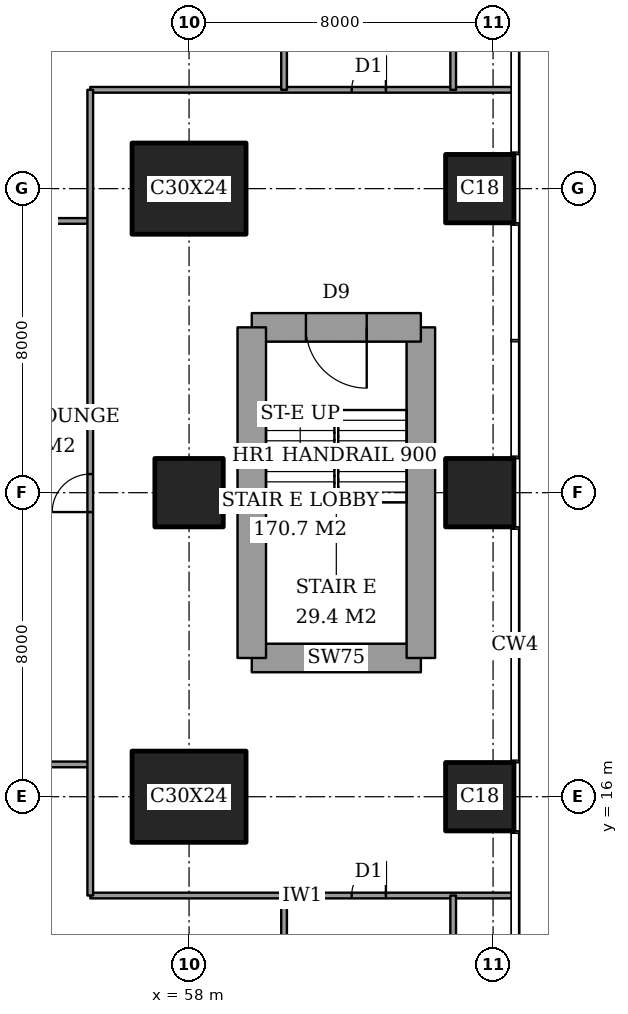
"""IFC4 building model, lengths in metres.
Left out: names, types, materials, properties, quantities, classifications, styles, units other than length and angle.
Written with IfcOpenShell. Run it as: python <this file> out.ifc"""

import sys

from ifc_helpers import new_model, si_unit, direction, frame, frame_2d, origin, origin_2d, place, context, subcontext, project, spatial, rectangle, extrude, element, fill, save


model = new_model("IFC4")
c1 = context("Model", 3, precision=1e-05, world=origin(), true_north=direction((0.0, 1.0)))
c2 = subcontext(c1, "Body", "Model", "MODEL_VIEW")
j1 = project(units=[si_unit("LENGTHUNIT", "METRE"), si_unit("PLANEANGLEUNIT", "RADIAN")], contexts=[c1])
p1 = place(None, origin())
s1 = spatial("IfcSite", under=j1, at=p1, CompositionType="ELEMENT")
p2 = place(p1, origin())
s2 = spatial("IfcBuilding", under=s1, at=p2, CompositionType="ELEMENT")
p3 = place(p2, frame((0.0, 0.0, 200.2)))
s3 = spatial("IfcBuildingStorey", under=s2, at=p3, CompositionType="ELEMENT", Elevation=200.2)
p4 = place(p3, frame((58.0, 16.0, 0.0), z_axis=(0.0, 0.0, 1.0), x_axis=(1.0, 0.0, 0.0)))
e1 = element("IfcColumn", 1, at=p4, inside=s3, PredefinedType="COLUMN", context=c2, shape_type="SweptSolid", body=[
    extrude(rectangle(XDim=3.0, YDim=2.4, at=origin_2d()), origin(), (0.0, 0.0, 1.0), 3.6),
])
p5 = place(p3, frame((58.0, 24.0, 0.0), z_axis=(0.0, 0.0, 1.0), x_axis=(1.0, 0.0, 0.0)))
e2 = element("IfcColumn", 2, at=p5, inside=s3, PredefinedType="COLUMN", context=c2, shape_type="SweptSolid", body=[
    extrude(rectangle(XDim=1.8, YDim=1.8, at=origin_2d()), origin(), (0.0, 0.0, 1.0), 3.6),
])
p6 = place(p3, frame((58.0, 32.0, 0.0), z_axis=(0.0, 0.0, 1.0), x_axis=(1.0, 0.0, 0.0)))
e3 = element("IfcColumn", 3, at=p6, inside=s3, PredefinedType="COLUMN", context=c2, shape_type="SweptSolid", body=[
    extrude(rectangle(XDim=3.0, YDim=2.4, at=origin_2d()), origin(), (0.0, 0.0, 1.0), 3.6),
])
for number, where, z_axis, x_axis in (
    (4, (65.65, 16.0, 0.0), (0.0, 0.0, 1.0), (1.0, 0.0, 0.0)),
    (5, (65.65, 24.0, 0.0), (0.0, 0.0, 1.0), (1.0, 0.0, 0.0)),
    (6, (65.65, 32.0, 0.0), (0.0, 0.0, 1.0), (1.0, 0.0, 0.0)),
):
    element("IfcColumn", number, at=place(p3, frame(where, z_axis=z_axis, x_axis=x_axis)), inside=s3, PredefinedType="COLUMN", context=c2, shape_type="SweptSolid", body=[
        extrude(rectangle(XDim=1.8, YDim=1.8, at=origin_2d()), origin(), (0.0, 0.0, 1.0), 3.6),
    ])
p7 = place(p3, frame((59.65, 19.65, 0.0), z_axis=(0.0, 0.0, 1.0), x_axis=(1.0, 0.0, 0.0)))
e7 = element("IfcWall", 7, at=p7, inside=s3, PredefinedType="SHEAR", context=c2, shape_type="SweptSolid", body=[
    extrude(rectangle(XDim=4.45, YDim=0.75, at=frame_2d((2.225, 0.0))), origin(), (0.0, 0.0, 1.0), 3.6),
])
p8 = place(p3, frame((64.1, 19.65, 0.0), z_axis=(0.0, 0.0, 1.0), x_axis=(0.0, 1.0, 0.0)))
e8 = element("IfcWall", 8, at=p8, inside=s3, PredefinedType="SHEAR", context=c2, shape_type="SweptSolid", body=[
    extrude(rectangle(XDim=8.7, YDim=0.75, at=frame_2d((4.35, 0.0))), origin(), (0.0, 0.0, 1.0), 3.6),
])
p9 = place(p3, frame((64.1, 28.35, 0.0), z_axis=(0.0, 0.0, 1.0), x_axis=(-1.0, 0.0, 0.0)))
e9 = element("IfcWall", 9, at=p9, inside=s3, PredefinedType="SHEAR", context=c2, shape_type="SweptSolid", body=[
    extrude(rectangle(XDim=4.45, YDim=0.75, at=frame_2d((2.225, 0.0))), origin(), (0.0, 0.0, 1.0), 3.6),
])
p10 = place(p9, frame((1.425, 0.0, 0.0)))
e10 = element("IfcOpeningElement", 10, at=p10, cuts=e9, PredefinedType="OPENING", context=c2, shape_type="SweptSolid", body=[
    extrude(rectangle(XDim=1.6, YDim=2.1, at=frame_2d((0.8, 1.05))), frame((0.0, 0.385, 0.0), z_axis=(0.0, -1.0, 0.0), x_axis=(1.0, 0.0, 0.0)), (0.0, 0.0, 1.0), 0.77),
])
p11 = place(p3, frame((59.65, 28.35, 0.0), z_axis=(0.0, 0.0, 1.0), x_axis=(0.0, -1.0, 0.0)))
e11 = element("IfcWall", 11, at=p11, inside=s3, PredefinedType="SHEAR", context=c2, shape_type="SweptSolid", body=[
    extrude(rectangle(XDim=8.7, YDim=0.75, at=frame_2d((4.35, 0.0))), origin(), (0.0, 0.0, 1.0), 3.6),
])
p12 = place(p3, frame((55.4, 13.4, 0.0), z_axis=(0.0, 0.0, 1.0), x_axis=(1.0, 0.0, 0.0)))
e12 = element("IfcWall", 12, at=p12, inside=s3, PredefinedType="PARTITIONING", context=c2, shape_type="SweptSolid", body=[
    extrude(rectangle(XDim=11.161, YDim=0.15, at=frame_2d((5.581, 0.0))), origin(), (0.0, 0.0, 1.0), 3.35),
])
p13 = place(p12, frame((6.88, 0.0, 0.0)))
e13 = element("IfcOpeningElement", 13, at=p13, cuts=e12, PredefinedType="OPENING", context=c2, shape_type="SweptSolid", body=[
    extrude(rectangle(XDim=0.9, YDim=2.1, at=frame_2d((0.45, 1.05))), frame((0.0, 0.085, 0.0), z_axis=(0.0, -1.0, 0.0), x_axis=(1.0, 0.0, 0.0)), (0.0, 0.0, 1.0), 0.17),
])
for number, where, z_axis, x_axis in (
    (14, (52.5, 16.85, 0.0), (0.0, 0.0, 1.0), (1.0, 0.0, 0.0)),
    (15, (52.5, 31.15, 0.0), (0.0, 0.0, 1.0), (1.0, 0.0, 0.0)),
):
    element("IfcWall", number, at=place(p3, frame(where, z_axis=z_axis, x_axis=x_axis)), inside=s3, PredefinedType="PARTITIONING", context=c2, shape_type="SweptSolid", body=[
        extrude(rectangle(XDim=2.9, YDim=0.15, at=frame_2d((1.45, 0.0))), origin(), (0.0, 0.0, 1.0), 3.35),
    ])
p14 = place(p3, frame((55.4, 34.6, 0.0), z_axis=(0.0, 0.0, 1.0), x_axis=(1.0, 0.0, 0.0)))
e16 = element("IfcWall", 16, at=p14, inside=s3, PredefinedType="PARTITIONING", context=c2, shape_type="SweptSolid", body=[
    extrude(rectangle(XDim=11.161, YDim=0.15, at=frame_2d((5.581, 0.0))), origin(), (0.0, 0.0, 1.0), 3.35),
])
p15 = place(p14, frame((6.88, 0.0, 0.0)))
e17 = element("IfcOpeningElement", 17, at=p15, cuts=e16, PredefinedType="OPENING", context=c2, shape_type="SweptSolid", body=[
    extrude(rectangle(XDim=0.9, YDim=2.1, at=frame_2d((0.45, 1.05))), frame((0.0, 0.085, 0.0), z_axis=(0.0, -1.0, 0.0), x_axis=(1.0, 0.0, 0.0)), (0.0, 0.0, 1.0), 0.17),
])
p16 = place(p3, frame((55.4, 13.4, 0.0), z_axis=(0.0, 0.0, 1.0), x_axis=(0.0, 1.0, 0.0)))
e18 = element("IfcWall", 18, at=p16, inside=s3, PredefinedType="PARTITIONING", context=c2, shape_type="SweptSolid", body=[
    extrude(rectangle(XDim=21.2, YDim=0.15, at=frame_2d((10.6, 0.0))), origin(), (0.0, 0.0, 1.0), 3.35),
])
p17 = place(p16, frame((10.09, 0.0, 0.0)))
e19 = element("IfcOpeningElement", 19, at=p17, cuts=e18, PredefinedType="OPENING", context=c2, shape_type="SweptSolid", body=[
    extrude(rectangle(XDim=1.0, YDim=2.1, at=frame_2d((0.5, 1.05))), frame((0.0, 0.085, 0.0), z_axis=(0.0, -1.0, 0.0), x_axis=(1.0, 0.0, 0.0)), (0.0, 0.0, 1.0), 0.17),
])
p18 = place(p3, frame((60.5, -0.45, 0.0), z_axis=(0.0, 0.0, 1.0), x_axis=(0.0, 1.0, 0.0)))
e20 = element("IfcWall", 20, at=p18, inside=s3, PredefinedType="PARTITIONING", context=c2, shape_type="SweptSolid", body=[
    extrude(rectangle(XDim=13.85, YDim=0.15, at=frame_2d((6.925, 0.0))), origin(), (0.0, 0.0, 1.0), 3.35),
])
p19 = place(p18, frame((6.48, 0.0, 0.0)))
e21 = element("IfcOpeningElement", 21, at=p19, cuts=e20, PredefinedType="OPENING", context=c2, shape_type="SweptSolid", body=[
    extrude(rectangle(XDim=0.9, YDim=2.1, at=frame_2d((0.45, 1.05))), frame((0.0, 0.085, 0.0), z_axis=(0.0, -1.0, 0.0), x_axis=(1.0, 0.0, 0.0)), (0.0, 0.0, 1.0), 0.17),
])
p20 = place(p3, frame((60.5, 34.6, 0.0), z_axis=(0.0, 0.0, 1.0), x_axis=(0.0, 1.0, 0.0)))
e22 = element("IfcWall", 22, at=p20, inside=s3, PredefinedType="PARTITIONING", context=c2, shape_type="SweptSolid", body=[
    extrude(rectangle(XDim=13.85, YDim=0.15, at=frame_2d((6.925, 0.0))), origin(), (0.0, 0.0, 1.0), 3.35),
])
p21 = place(p20, frame((6.48, 0.0, 0.0)))
e23 = element("IfcOpeningElement", 23, at=p21, cuts=e22, PredefinedType="OPENING", context=c2, shape_type="SweptSolid", body=[
    extrude(rectangle(XDim=0.9, YDim=2.1, at=frame_2d((0.45, 1.05))), frame((0.0, 0.085, 0.0), z_axis=(0.0, -1.0, 0.0), x_axis=(1.0, 0.0, 0.0)), (0.0, 0.0, 1.0), 0.17),
])
for number, where, z_axis, x_axis in (
    (24, (64.95, 8.9, 0.0), (0.0, 0.0, 1.0), (0.0, 1.0, 0.0)),
    (25, (64.95, 34.6, 0.0), (0.0, 0.0, 1.0), (0.0, 1.0, 0.0)),
):
    element("IfcWall", number, at=place(p3, frame(where, z_axis=z_axis, x_axis=x_axis)), inside=s3, PredefinedType="PARTITIONING", context=c2, shape_type="SweptSolid", body=[
        extrude(rectangle(XDim=4.5, YDim=0.15, at=frame_2d((2.25, 0.0))), origin(), (0.0, 0.0, 1.0), 3.35),
    ])
p22 = place(p17, origin())
e26 = element("IfcDoor", 26, at=p22, inside=s3, OperationType="SINGLE_SWING_RIGHT", PredefinedType="DOOR", context=c2, shape_type="SweptSolid", body=[
    extrude(rectangle(XDim=1.0, YDim=2.1, at=frame_2d((0.5, 1.05))), frame((0.0, 0.025, 0.0), z_axis=(0.0, -1.0, 0.0), x_axis=(1.0, 0.0, 0.0)), (0.0, 0.0, 1.0), 0.05),
])
fill(e19, e26)
p23 = place(p13, origin())
e27 = element("IfcDoor", 27, at=p23, inside=s3, OperationType="SINGLE_SWING_LEFT", PredefinedType="DOOR", context=c2, shape_type="SweptSolid", body=[
    extrude(rectangle(XDim=0.9, YDim=2.1, at=frame_2d((0.45, 1.05))), frame((0.0, 0.025, 0.0), z_axis=(0.0, -1.0, 0.0), x_axis=(1.0, 0.0, 0.0)), (0.0, 0.0, 1.0), 0.05),
])
fill(e13, e27)
p24 = place(p15, origin())
e28 = element("IfcDoor", 28, at=p24, inside=s3, OperationType="SINGLE_SWING_LEFT", PredefinedType="DOOR", context=c2, shape_type="SweptSolid", body=[
    extrude(rectangle(XDim=0.9, YDim=2.1, at=frame_2d((0.45, 1.05))), frame((0.0, 0.025, 0.0), z_axis=(0.0, -1.0, 0.0), x_axis=(1.0, 0.0, 0.0)), (0.0, 0.0, 1.0), 0.05),
])
fill(e17, e28)
p25 = place(p10, origin())
e29 = element("IfcDoor", 29, at=p25, inside=s3, OperationType="DOUBLE_DOOR_SINGLE_SWING", PredefinedType="DOOR", context=c2, shape_type="SweptSolid", body=[
    extrude(rectangle(XDim=1.6, YDim=2.1, at=frame_2d((0.8, 1.05))), frame((0.0, 0.025, 0.0), z_axis=(0.0, -1.0, 0.0), x_axis=(1.0, 0.0, 0.0)), (0.0, 0.0, 1.0), 0.05),
])
fill(e10, e29)
save(model, sys.argv[1])
